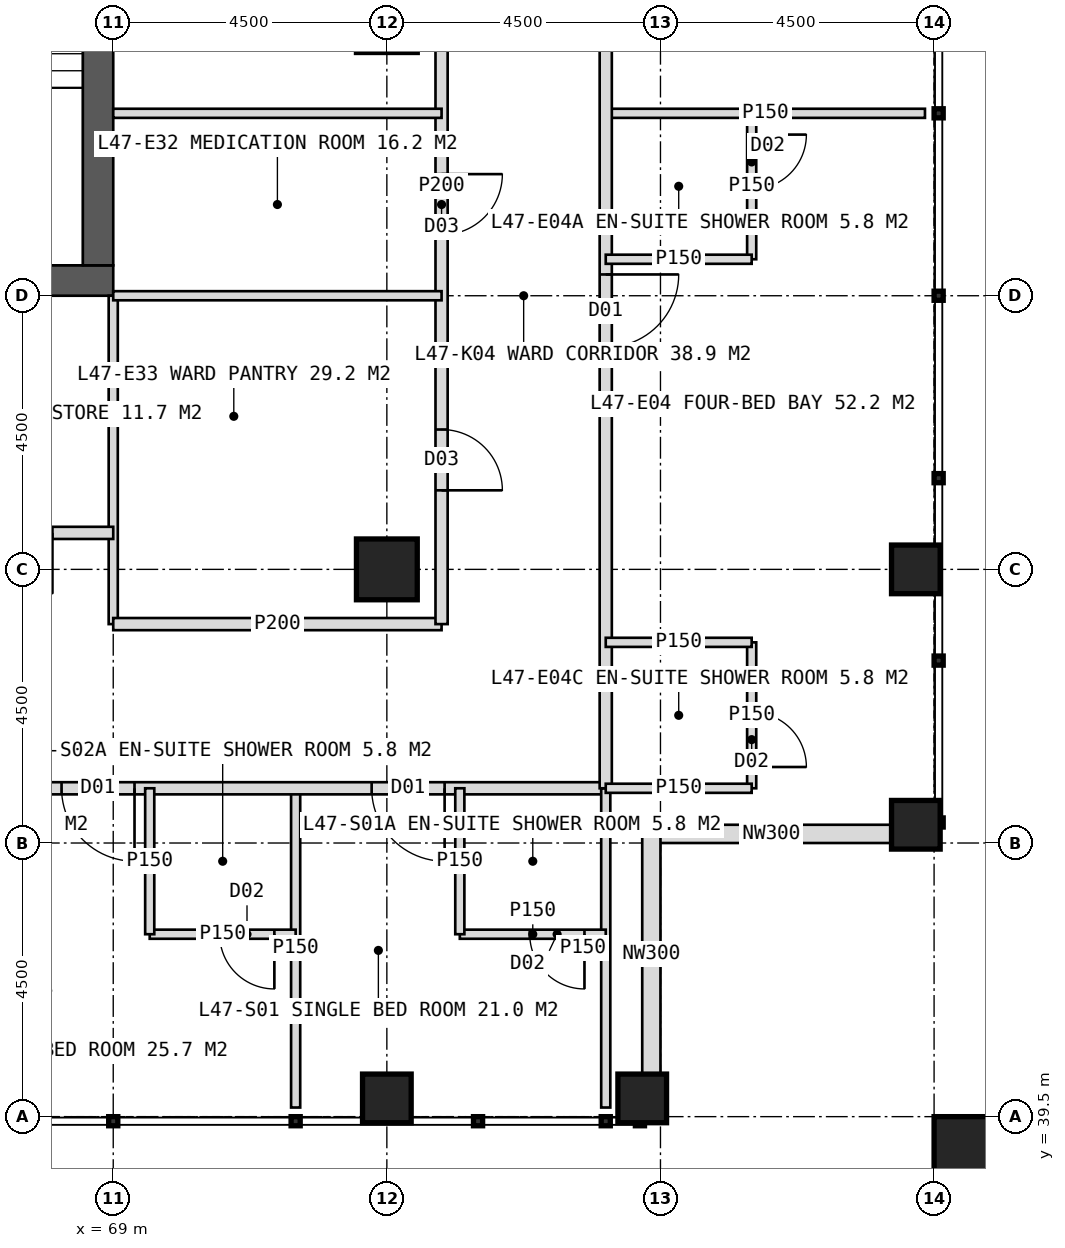
"""IFC4 building model, lengths in metres.
Left out: names, types, materials, properties, quantities, classifications, styles, units other than length and angle.
Written with IfcOpenShell. Run it as: python <this file> out.ifc"""

import sys

from ifc_helpers import new_model, si_unit, direction, frame, frame_2d, origin, origin_2d, place, context, subcontext, project, spatial, rectangle, hollow_rectangle, extrude, element, fill, save


model = new_model("IFC4")
c1 = context("Model", 3, precision=1e-05, world=origin(), true_north=direction((0.0, 1.0)))
c2 = subcontext(c1, "Body", "Model", "MODEL_VIEW")
j1 = project(units=[si_unit("LENGTHUNIT", "METRE"), si_unit("PLANEANGLEUNIT", "RADIAN")], contexts=[c1])
p1 = place(None, origin())
s1 = spatial("IfcSite", under=j1, at=p1, CompositionType="ELEMENT")
p2 = place(p1, origin())
s2 = spatial("IfcBuilding", under=s1, at=p2, CompositionType="ELEMENT")
p3 = place(p2, frame((0.0, 0.0, 197.0)))
s3 = spatial("IfcBuildingStorey", under=s2, at=p3, CompositionType="ELEMENT", Elevation=197.0)
p4 = place(p3, frame((51.0, 53.25, 0.0), z_axis=(0.0, 0.0, 1.0), x_axis=(1.0, 0.0, 0.0)))
e1 = element("IfcWall", 1, at=p4, inside=s3, PredefinedType="SHEAR", context=c2, shape_type="SweptSolid", body=[
    extrude(rectangle(XDim=18.0, YDim=0.5, at=frame_2d((9.0, 0.0))), origin(), (0.0, 0.0, 1.0), 4.0),
])
p5 = place(p4, frame((8.1, 0.0, 0.0)))
e2 = element("IfcOpeningElement", 2, at=p5, cuts=e1, PredefinedType="OPENING", context=c2, shape_type="SweptSolid", body=[
    extrude(rectangle(XDim=1.8, YDim=2.2, at=frame_2d((0.9, 1.1))), frame((0.0, 0.26, 0.0), z_axis=(0.0, -1.0, 0.0), x_axis=(1.0, 0.0, 0.0)), (0.0, 0.0, 1.0), 0.52),
])
p6 = place(p3, frame((68.75, 53.5, 0.0), z_axis=(0.0, 0.0, 1.0), x_axis=(0.0, 1.0, 0.0)))
e3 = element("IfcWall", 3, at=p6, inside=s3, PredefinedType="SHEAR", context=c2, shape_type="SweptSolid", body=[
    extrude(rectangle(XDim=17.0, YDim=0.5, at=frame_2d((8.5, 0.0))), origin(), (0.0, 0.0, 1.0), 4.0),
])
p7 = place(p6, frame((9.6, 0.0, 0.0)))
e4 = element("IfcOpeningElement", 4, at=p7, cuts=e3, PredefinedType="OPENING", context=c2, shape_type="SweptSolid", body=[
    extrude(rectangle(XDim=1.5, YDim=2.2, at=frame_2d((0.75, 1.1))), frame((0.0, 0.26, 0.0), z_axis=(0.0, -1.0, 0.0), x_axis=(1.0, 0.0, 0.0)), (0.0, 0.0, 1.0), 0.52),
])
p8 = place(p3, frame((73.5, 48.5, 0.0), z_axis=(0.0, 0.0, 1.0), x_axis=(1.0, 0.0, 0.0)))
e5 = element("IfcColumn", 5, at=p8, inside=s3, PredefinedType="COLUMN", context=c2, shape_type="SweptSolid", body=[
    extrude(hollow_rectangle(XDim=1.0, YDim=1.0, WallThickness=0.1, at=origin_2d()), origin(), (0.0, 0.0, 1.0), 4.0),
])
for number, where, z_axis, x_axis in (
    (6, (82.2, 44.3, 0.0), (0.0, 0.0, 1.0), (1.0, 0.0, 0.0)),
    (7, (82.2, 48.5, 0.0), (0.0, 0.0, 1.0), (1.0, 0.0, 0.0)),
    (8, (73.5, 39.8, 0.0), (0.0, 0.0, 1.0), (1.0, 0.0, 0.0)),
    (9, (77.7, 39.8, 0.0), (0.0, 0.0, 1.0), (1.0, 0.0, 0.0)),
):
    element("IfcColumn", number, at=place(p3, frame(where, z_axis=z_axis, x_axis=x_axis)), inside=s3, PredefinedType="COLUMN", context=c2, shape_type="SweptSolid", body=[
        extrude(hollow_rectangle(XDim=0.8, YDim=0.8, WallThickness=0.08, at=origin_2d()), origin(), (0.0, 0.0, 1.0), 4.0),
    ])
p9 = place(p3, frame((83.1, 38.9, 0.0), z_axis=(0.0, 0.0, 1.0), x_axis=(1.0, 0.0, 0.0)))
e10 = element("IfcColumn", 10, at=p9, inside=s3, PredefinedType="COLUMN", context=c2, shape_type="SweptSolid", body=[
    extrude(hollow_rectangle(XDim=1.2, YDim=1.2, WallThickness=0.07, at=origin_2d()), origin(), (0.0, 0.0, 1.0), 4.0),
])
for number, where, z_axis, x_axis in (
    (11, (81.8, 44.15, 0.0), (0.0, 0.0, 1.0), (-1.0, 0.0, 0.0)),
    (12, (77.85, 44.15, 0.0), (0.0, 0.0, 1.0), (0.0, -1.0, 0.0)),
):
    element("IfcWall", number, at=place(p3, frame(where, z_axis=z_axis, x_axis=x_axis)), inside=s3, PredefinedType="ELEMENTEDWALL", context=c2, shape_type="SweptSolid", body=[
        extrude(rectangle(XDim=3.95, YDim=0.3, at=frame_2d((1.975, 0.0))), origin(), (0.0, 0.0, 1.0), 2.85),
    ])
p10 = place(p3, frame((72.0, 44.9, 0.0), z_axis=(0.0, 0.0, 1.0), x_axis=(0.0, -1.0, 0.0)))
e13 = element("IfcWall", 13, at=p10, inside=s3, PredefinedType="PARTITIONING", context=c2, shape_type="SweptSolid", body=[
    extrude(rectangle(XDim=5.25, YDim=0.15, at=frame_2d((2.625, 0.0))), origin(), (0.0, 0.0, 1.0), 3.75),
])
p11 = place(p3, frame((77.1, 44.9, 0.0), z_axis=(0.0, 0.0, 1.0), x_axis=(-1.0, 0.0, 0.0)))
e14 = element("IfcWall", 14, at=p11, inside=s3, PredefinedType="PARTITIONING", context=c2, shape_type="SweptSolid", body=[
    extrude(rectangle(XDim=34.2, YDim=0.2, at=frame_2d((17.1, 0.0))), origin(), (0.0, 0.0, 1.0), 3.75),
])
p12 = place(p11, frame((2.65, 0.0, 0.0)))
e15 = element("IfcOpeningElement", 15, at=p12, cuts=e14, PredefinedType="OPENING", context=c2, shape_type="SweptSolid", body=[
    extrude(rectangle(XDim=1.2, YDim=2.2, at=frame_2d((0.6, 1.1))), frame((0.0, 0.11, 0.0), z_axis=(0.0, -1.0, 0.0), x_axis=(1.0, 0.0, 0.0)), (0.0, 0.0, 1.0), 0.22),
])
p13 = place(p11, frame((7.75, 0.0, 0.0)))
e16 = element("IfcOpeningElement", 16, at=p13, cuts=e14, PredefinedType="OPENING", context=c2, shape_type="SweptSolid", body=[
    extrude(rectangle(XDim=1.2, YDim=2.2, at=frame_2d((0.6, 1.1))), frame((0.0, 0.11, 0.0), z_axis=(0.0, -1.0, 0.0), x_axis=(1.0, 0.0, 0.0)), (0.0, 0.0, 1.0), 0.22),
])
p14 = place(p11, frame((13.75, 0.0, 0.0)))
e17 = element("IfcOpeningElement", 17, at=p14, cuts=e14, PredefinedType="OPENING", context=c2, shape_type="SweptSolid", body=[
    extrude(rectangle(XDim=1.2, YDim=2.2, at=frame_2d((0.6, 1.1))), frame((0.0, 0.11, 0.0), z_axis=(0.0, -1.0, 0.0), x_axis=(1.0, 0.0, 0.0)), (0.0, 0.0, 1.0), 0.22),
])
p15 = place(p11, frame((19.75, 0.0, 0.0)))
e18 = element("IfcOpeningElement", 18, at=p15, cuts=e14, PredefinedType="OPENING", context=c2, shape_type="SweptSolid", body=[
    extrude(rectangle(XDim=1.2, YDim=2.2, at=frame_2d((0.6, 1.1))), frame((0.0, 0.11, 0.0), z_axis=(0.0, -1.0, 0.0), x_axis=(1.0, 0.0, 0.0)), (0.0, 0.0, 1.0), 0.22),
])
p16 = place(p11, frame((25.75, 0.0, 0.0)))
e19 = element("IfcOpeningElement", 19, at=p16, cuts=e14, PredefinedType="OPENING", context=c2, shape_type="SweptSolid", body=[
    extrude(rectangle(XDim=1.2, YDim=2.2, at=frame_2d((0.6, 1.1))), frame((0.0, 0.11, 0.0), z_axis=(0.0, -1.0, 0.0), x_axis=(1.0, 0.0, 0.0)), (0.0, 0.0, 1.0), 0.22),
])
p17 = place(p3, frame((77.1, 44.9, 0.0), z_axis=(0.0, 0.0, 1.0), x_axis=(0.0, -1.0, 0.0)))
e20 = element("IfcWall", 20, at=p17, inside=s3, PredefinedType="PARTITIONING", context=c2, shape_type="SweptSolid", body=[
    extrude(rectangle(XDim=5.25, YDim=0.15, at=frame_2d((2.625, 0.0))), origin(), (0.0, 0.0, 1.0), 3.75),
])
p18 = place(p3, frame((77.1, 42.5, 0.0), z_axis=(0.0, 0.0, 1.0), x_axis=(-1.0, 0.0, 0.0)))
e21 = element("IfcWall", 21, at=p18, inside=s3, PredefinedType="PARTITIONING", context=c2, shape_type="SweptSolid", body=[
    extrude(rectangle(XDim=2.4, YDim=0.15, at=frame_2d((1.2, 0.0))), origin(), (0.0, 0.0, 1.0), 3.75),
])
p19 = place(p18, frame((0.35, 0.0, 0.0)))
e22 = element("IfcOpeningElement", 22, at=p19, cuts=e21, PredefinedType="OPENING", context=c2, shape_type="SweptSolid", body=[
    extrude(rectangle(XDim=0.9, YDim=2.1, at=frame_2d((0.45, 1.05))), frame((0.0, 0.085, 0.0), z_axis=(0.0, -1.0, 0.0), x_axis=(1.0, 0.0, 0.0)), (0.0, 0.0, 1.0), 0.17),
])
p20 = place(p3, frame((74.7, 44.9, 0.0), z_axis=(0.0, 0.0, 1.0), x_axis=(0.0, -1.0, 0.0)))
e23 = element("IfcWall", 23, at=p20, inside=s3, PredefinedType="PARTITIONING", context=c2, shape_type="SweptSolid", body=[
    extrude(rectangle(XDim=2.4, YDim=0.15, at=frame_2d((1.2, 0.0))), origin(), (0.0, 0.0, 1.0), 3.75),
])
p21 = place(p3, frame((72.0, 42.5, 0.0), z_axis=(0.0, 0.0, 1.0), x_axis=(-1.0, 0.0, 0.0)))
e24 = element("IfcWall", 24, at=p21, inside=s3, PredefinedType="PARTITIONING", context=c2, shape_type="SweptSolid", body=[
    extrude(rectangle(XDim=2.4, YDim=0.15, at=frame_2d((1.2, 0.0))), origin(), (0.0, 0.0, 1.0), 3.75),
])
p22 = place(p21, frame((0.35, 0.0, 0.0)))
e25 = element("IfcOpeningElement", 25, at=p22, cuts=e24, PredefinedType="OPENING", context=c2, shape_type="SweptSolid", body=[
    extrude(rectangle(XDim=0.9, YDim=2.1, at=frame_2d((0.45, 1.05))), frame((0.0, 0.085, 0.0), z_axis=(0.0, -1.0, 0.0), x_axis=(1.0, 0.0, 0.0)), (0.0, 0.0, 1.0), 0.17),
])
p23 = place(p3, frame((69.6, 44.9, 0.0), z_axis=(0.0, 0.0, 1.0), x_axis=(0.0, -1.0, 0.0)))
e26 = element("IfcWall", 26, at=p23, inside=s3, PredefinedType="PARTITIONING", context=c2, shape_type="SweptSolid", body=[
    extrude(rectangle(XDim=2.4, YDim=0.15, at=frame_2d((1.2, 0.0))), origin(), (0.0, 0.0, 1.0), 3.75),
])
p24 = place(p3, frame((69.0, 53.0, 0.0), z_axis=(0.0, 0.0, 1.0), x_axis=(0.0, -1.0, 0.0)))
e27 = element("IfcWall", 27, at=p24, inside=s3, PredefinedType="PARTITIONING", context=c2, shape_type="SweptSolid", body=[
    extrude(rectangle(XDim=5.4, YDim=0.15, at=frame_2d((2.7, 0.0))), origin(), (0.0, 0.0, 1.0), 3.75),
])
p25 = place(p3, frame((74.4, 47.6, 0.0), z_axis=(0.0, 0.0, 1.0), x_axis=(-1.0, 0.0, 0.0)))
e28 = element("IfcWall", 28, at=p25, inside=s3, PredefinedType="PARTITIONING", context=c2, shape_type="SweptSolid", body=[
    extrude(rectangle(XDim=5.4, YDim=0.2, at=frame_2d((2.7, 0.0))), origin(), (0.0, 0.0, 1.0), 3.75),
])
p26 = place(p3, frame((69.0, 49.1, 0.0), z_axis=(0.0, 0.0, 1.0), x_axis=(-1.0, 0.0, 0.0)))
e29 = element("IfcWall", 29, at=p26, inside=s3, PredefinedType="PARTITIONING", context=c2, shape_type="SweptSolid", body=[
    extrude(rectangle(XDim=6.75, YDim=0.2, at=frame_2d((3.375, 0.0))), origin(), (0.0, 0.0, 1.0), 3.75),
])
p27 = place(p26, frame((1.0, 0.0, 0.0)))
e30 = element("IfcOpeningElement", 30, at=p27, cuts=e29, PredefinedType="OPENING", context=c2, shape_type="SweptSolid", body=[
    extrude(rectangle(XDim=1.0, YDim=2.1, at=frame_2d((0.5, 1.05))), frame((0.0, 0.11, 0.0), z_axis=(0.0, -1.0, 0.0), x_axis=(1.0, 0.0, 0.0)), (0.0, 0.0, 1.0), 0.22),
])
p28 = place(p26, frame((5.425, 0.0, 0.0)))
e31 = element("IfcOpeningElement", 31, at=p28, cuts=e29, PredefinedType="OPENING", context=c2, shape_type="SweptSolid", body=[
    extrude(rectangle(XDim=1.0, YDim=2.1, at=frame_2d((0.5, 1.05))), frame((0.0, 0.11, 0.0), z_axis=(0.0, -1.0, 0.0), x_axis=(1.0, 0.0, 0.0)), (0.0, 0.0, 1.0), 0.22),
])
p29 = place(p3, frame((77.1, 56.0, 0.0), z_axis=(0.0, 0.0, 1.0), x_axis=(1.0, 0.0, 0.0)))
e32 = element("IfcWall", 32, at=p29, inside=s3, PredefinedType="PARTITIONING", context=c2, shape_type="SweptSolid", body=[
    extrude(rectangle(XDim=5.25, YDim=0.15, at=frame_2d((2.625, 0.0))), origin(), (0.0, 0.0, 1.0), 3.75),
])
p30 = place(p3, frame((77.1, 79.1, 0.0), z_axis=(0.0, 0.0, 1.0), x_axis=(0.0, -1.0, 0.0)))
e33 = element("IfcWall", 33, at=p30, inside=s3, PredefinedType="PARTITIONING", context=c2, shape_type="SweptSolid", body=[
    extrude(rectangle(XDim=34.2, YDim=0.2, at=frame_2d((17.1, 0.0))), origin(), (0.0, 0.0, 1.0), 3.75),
])
p31 = place(p30, frame((3.25, 0.0, 0.0)))
e34 = element("IfcOpeningElement", 34, at=p31, cuts=e33, PredefinedType="OPENING", context=c2, shape_type="SweptSolid", body=[
    extrude(rectangle(XDim=1.2, YDim=2.2, at=frame_2d((0.6, 1.1))), frame((0.0, 0.11, 0.0), z_axis=(0.0, -1.0, 0.0), x_axis=(1.0, 0.0, 0.0)), (0.0, 0.0, 1.0), 0.22),
])
p32 = place(p30, frame((11.35, 0.0, 0.0)))
e35 = element("IfcOpeningElement", 35, at=p32, cuts=e33, PredefinedType="OPENING", context=c2, shape_type="SweptSolid", body=[
    extrude(rectangle(XDim=1.2, YDim=2.2, at=frame_2d((0.6, 1.1))), frame((0.0, 0.11, 0.0), z_axis=(0.0, -1.0, 0.0), x_axis=(1.0, 0.0, 0.0)), (0.0, 0.0, 1.0), 0.22),
])
p33 = place(p30, frame((19.75, 0.0, 0.0)))
e36 = element("IfcOpeningElement", 36, at=p33, cuts=e33, PredefinedType="OPENING", context=c2, shape_type="SweptSolid", body=[
    extrude(rectangle(XDim=1.2, YDim=2.2, at=frame_2d((0.6, 1.1))), frame((0.0, 0.11, 0.0), z_axis=(0.0, -1.0, 0.0), x_axis=(1.0, 0.0, 0.0)), (0.0, 0.0, 1.0), 0.22),
])
p34 = place(p30, frame((25.75, 0.0, 0.0)))
e37 = element("IfcOpeningElement", 37, at=p34, cuts=e33, PredefinedType="OPENING", context=c2, shape_type="SweptSolid", body=[
    extrude(rectangle(XDim=1.2, YDim=2.2, at=frame_2d((0.6, 1.1))), frame((0.0, 0.11, 0.0), z_axis=(0.0, -1.0, 0.0), x_axis=(1.0, 0.0, 0.0)), (0.0, 0.0, 1.0), 0.22),
])
p35 = place(p3, frame((79.5, 56.0, 0.0), z_axis=(0.0, 0.0, 1.0), x_axis=(0.0, -1.0, 0.0)))
e38 = element("IfcWall", 38, at=p35, inside=s3, PredefinedType="PARTITIONING", context=c2, shape_type="SweptSolid", body=[
    extrude(rectangle(XDim=2.4, YDim=0.15, at=frame_2d((1.2, 0.0))), origin(), (0.0, 0.0, 1.0), 3.75),
])
p36 = place(p35, frame((0.35, 0.0, 0.0)))
e39 = element("IfcOpeningElement", 39, at=p36, cuts=e38, PredefinedType="OPENING", context=c2, shape_type="SweptSolid", body=[
    extrude(rectangle(XDim=0.9, YDim=2.1, at=frame_2d((0.45, 1.05))), frame((0.0, 0.085, 0.0), z_axis=(0.0, -1.0, 0.0), x_axis=(1.0, 0.0, 0.0)), (0.0, 0.0, 1.0), 0.17),
])
p37 = place(p3, frame((77.1, 53.6, 0.0), z_axis=(0.0, 0.0, 1.0), x_axis=(1.0, 0.0, 0.0)))
e40 = element("IfcWall", 40, at=p37, inside=s3, PredefinedType="PARTITIONING", context=c2, shape_type="SweptSolid", body=[
    extrude(rectangle(XDim=2.4, YDim=0.15, at=frame_2d((1.2, 0.0))), origin(), (0.0, 0.0, 1.0), 3.75),
])
p38 = place(p3, frame((79.5, 47.3, 0.0), z_axis=(0.0, 0.0, 1.0), x_axis=(0.0, -1.0, 0.0)))
e41 = element("IfcWall", 41, at=p38, inside=s3, PredefinedType="PARTITIONING", context=c2, shape_type="SweptSolid", body=[
    extrude(rectangle(XDim=2.4, YDim=0.15, at=frame_2d((1.2, 0.0))), origin(), (0.0, 0.0, 1.0), 3.75),
])
p39 = place(p38, frame((1.15, 0.0, 0.0)))
e42 = element("IfcOpeningElement", 42, at=p39, cuts=e41, PredefinedType="OPENING", context=c2, shape_type="SweptSolid", body=[
    extrude(rectangle(XDim=0.9, YDim=2.1, at=frame_2d((0.45, 1.05))), frame((0.0, 0.085, 0.0), z_axis=(0.0, -1.0, 0.0), x_axis=(1.0, 0.0, 0.0)), (0.0, 0.0, 1.0), 0.17),
])
for number, where, z_axis, x_axis in (
    (43, (77.1, 47.3, 0.0), (0.0, 0.0, 1.0), (1.0, 0.0, 0.0)),
    (44, (77.1, 44.9, 0.0), (0.0, 0.0, 1.0), (1.0, 0.0, 0.0)),
):
    element("IfcWall", number, at=place(p3, frame(where, z_axis=z_axis, x_axis=x_axis)), inside=s3, PredefinedType="PARTITIONING", context=c2, shape_type="SweptSolid", body=[
        extrude(rectangle(XDim=2.4, YDim=0.15, at=frame_2d((1.2, 0.0))), origin(), (0.0, 0.0, 1.0), 3.75),
    ])
p40 = place(p3, frame((74.4, 62.0, 0.0), z_axis=(0.0, 0.0, 1.0), x_axis=(0.0, -1.0, 0.0)))
e45 = element("IfcWall", 45, at=p40, inside=s3, PredefinedType="PARTITIONING", context=c2, shape_type="SweptSolid", body=[
    extrude(rectangle(XDim=14.4, YDim=0.2, at=frame_2d((7.2, 0.0))), origin(), (0.0, 0.0, 1.0), 3.75),
])
p41 = place(p40, frame((2.5, 0.0, 0.0)))
e46 = element("IfcOpeningElement", 46, at=p41, cuts=e45, PredefinedType="OPENING", context=c2, shape_type="SweptSolid", body=[
    extrude(rectangle(XDim=1.0, YDim=2.1, at=frame_2d((0.5, 1.05))), frame((0.0, 0.11, 0.0), z_axis=(0.0, -1.0, 0.0), x_axis=(1.0, 0.0, 0.0)), (0.0, 0.0, 1.0), 0.22),
])
p42 = place(p40, frame((7.0, 0.0, 0.0)))
e47 = element("IfcOpeningElement", 47, at=p42, cuts=e45, PredefinedType="OPENING", context=c2, shape_type="SweptSolid", body=[
    extrude(rectangle(XDim=1.0, YDim=2.1, at=frame_2d((0.5, 1.05))), frame((0.0, 0.11, 0.0), z_axis=(0.0, -1.0, 0.0), x_axis=(1.0, 0.0, 0.0)), (0.0, 0.0, 1.0), 0.22),
])
p43 = place(p40, frame((11.2, 0.0, 0.0)))
e48 = element("IfcOpeningElement", 48, at=p43, cuts=e45, PredefinedType="OPENING", context=c2, shape_type="SweptSolid", body=[
    extrude(rectangle(XDim=1.0, YDim=2.1, at=frame_2d((0.5, 1.05))), frame((0.0, 0.11, 0.0), z_axis=(0.0, -1.0, 0.0), x_axis=(1.0, 0.0, 0.0)), (0.0, 0.0, 1.0), 0.22),
])
for number, where, z_axis, x_axis in (
    (49, (69.0, 56.0, 0.0), (0.0, 0.0, 1.0), (1.0, 0.0, 0.0)),
    (50, (69.0, 53.0, 0.0), (0.0, 0.0, 1.0), (1.0, 0.0, 0.0)),
):
    element("IfcWall", number, at=place(p3, frame(where, z_axis=z_axis, x_axis=x_axis)), inside=s3, PredefinedType="PARTITIONING", context=c2, shape_type="SweptSolid", body=[
        extrude(rectangle(XDim=5.4, YDim=0.15, at=frame_2d((2.7, 0.0))), origin(), (0.0, 0.0, 1.0), 3.75),
    ])
p44 = place(p12, origin())
e51 = element("IfcDoor", 51, at=p44, inside=s3, OperationType="SINGLE_SWING_LEFT", PredefinedType="DOOR", context=c2, shape_type="SweptSolid", body=[
    extrude(rectangle(XDim=1.2, YDim=2.2, at=frame_2d((0.6, 1.1))), frame((0.0, 0.025, 0.0), z_axis=(0.0, -1.0, 0.0), x_axis=(1.0, 0.0, 0.0)), (0.0, 0.0, 1.0), 0.05),
])
fill(e15, e51)
p45 = place(p19, origin())
e52 = element("IfcDoor", 52, at=p45, inside=s3, OperationType="SINGLE_SWING_LEFT", PredefinedType="DOOR", context=c2, shape_type="SweptSolid", body=[
    extrude(rectangle(XDim=0.9, YDim=2.1, at=frame_2d((0.45, 1.05))), frame((0.0, 0.025, 0.0), z_axis=(0.0, -1.0, 0.0), x_axis=(1.0, 0.0, 0.0)), (0.0, 0.0, 1.0), 0.05),
])
fill(e22, e52)
p46 = place(p13, origin())
e53 = element("IfcDoor", 53, at=p46, inside=s3, OperationType="SINGLE_SWING_LEFT", PredefinedType="DOOR", context=c2, shape_type="SweptSolid", body=[
    extrude(rectangle(XDim=1.2, YDim=2.2, at=frame_2d((0.6, 1.1))), frame((0.0, 0.025, 0.0), z_axis=(0.0, -1.0, 0.0), x_axis=(1.0, 0.0, 0.0)), (0.0, 0.0, 1.0), 0.05),
])
fill(e16, e53)
p47 = place(p22, origin())
e54 = element("IfcDoor", 54, at=p47, inside=s3, OperationType="SINGLE_SWING_LEFT", PredefinedType="DOOR", context=c2, shape_type="SweptSolid", body=[
    extrude(rectangle(XDim=0.9, YDim=2.1, at=frame_2d((0.45, 1.05))), frame((0.0, 0.025, 0.0), z_axis=(0.0, -1.0, 0.0), x_axis=(1.0, 0.0, 0.0)), (0.0, 0.0, 1.0), 0.05),
])
fill(e25, e54)
p48 = place(p34, origin())
e55 = element("IfcDoor", 55, at=p48, inside=s3, OperationType="SINGLE_SWING_LEFT", PredefinedType="DOOR", context=c2, shape_type="SweptSolid", body=[
    extrude(rectangle(XDim=1.2, YDim=2.2, at=frame_2d((0.6, 1.1))), frame((0.0, 0.025, 0.0), z_axis=(0.0, -1.0, 0.0), x_axis=(1.0, 0.0, 0.0)), (0.0, 0.0, 1.0), 0.05),
])
fill(e37, e55)
p49 = place(p36, origin())
e56 = element("IfcDoor", 56, at=p49, inside=s3, OperationType="SINGLE_SWING_LEFT", PredefinedType="DOOR", context=c2, shape_type="SweptSolid", body=[
    extrude(rectangle(XDim=0.9, YDim=2.1, at=frame_2d((0.45, 1.05))), frame((0.0, 0.025, 0.0), z_axis=(0.0, -1.0, 0.0), x_axis=(1.0, 0.0, 0.0)), (0.0, 0.0, 1.0), 0.05),
])
fill(e39, e56)
p50 = place(p39, origin())
e57 = element("IfcDoor", 57, at=p50, inside=s3, OperationType="SINGLE_SWING_RIGHT", PredefinedType="DOOR", context=c2, shape_type="SweptSolid", body=[
    extrude(rectangle(XDim=0.9, YDim=2.1, at=frame_2d((0.45, 1.05))), frame((0.0, 0.025, 0.0), z_axis=(0.0, -1.0, 0.0), x_axis=(1.0, 0.0, 0.0)), (0.0, 0.0, 1.0), 0.05),
])
fill(e42, e57)
p51 = place(p42, origin())
e58 = element("IfcDoor", 58, at=p51, inside=s3, OperationType="SINGLE_SWING_LEFT", PredefinedType="DOOR", context=c2, shape_type="SweptSolid", body=[
    extrude(rectangle(XDim=1.0, YDim=2.1, at=frame_2d((0.5, 1.05))), frame((0.0, 0.025, 0.0), z_axis=(0.0, -1.0, 0.0), x_axis=(1.0, 0.0, 0.0)), (0.0, 0.0, 1.0), 0.05),
])
fill(e47, e58)
p52 = place(p43, origin())
e59 = element("IfcDoor", 59, at=p52, inside=s3, OperationType="SINGLE_SWING_RIGHT", PredefinedType="DOOR", context=c2, shape_type="SweptSolid", body=[
    extrude(rectangle(XDim=1.0, YDim=2.1, at=frame_2d((0.5, 1.05))), frame((0.0, 0.025, 0.0), z_axis=(0.0, -1.0, 0.0), x_axis=(1.0, 0.0, 0.0)), (0.0, 0.0, 1.0), 0.05),
])
fill(e48, e59)
save(model, sys.argv[1])
